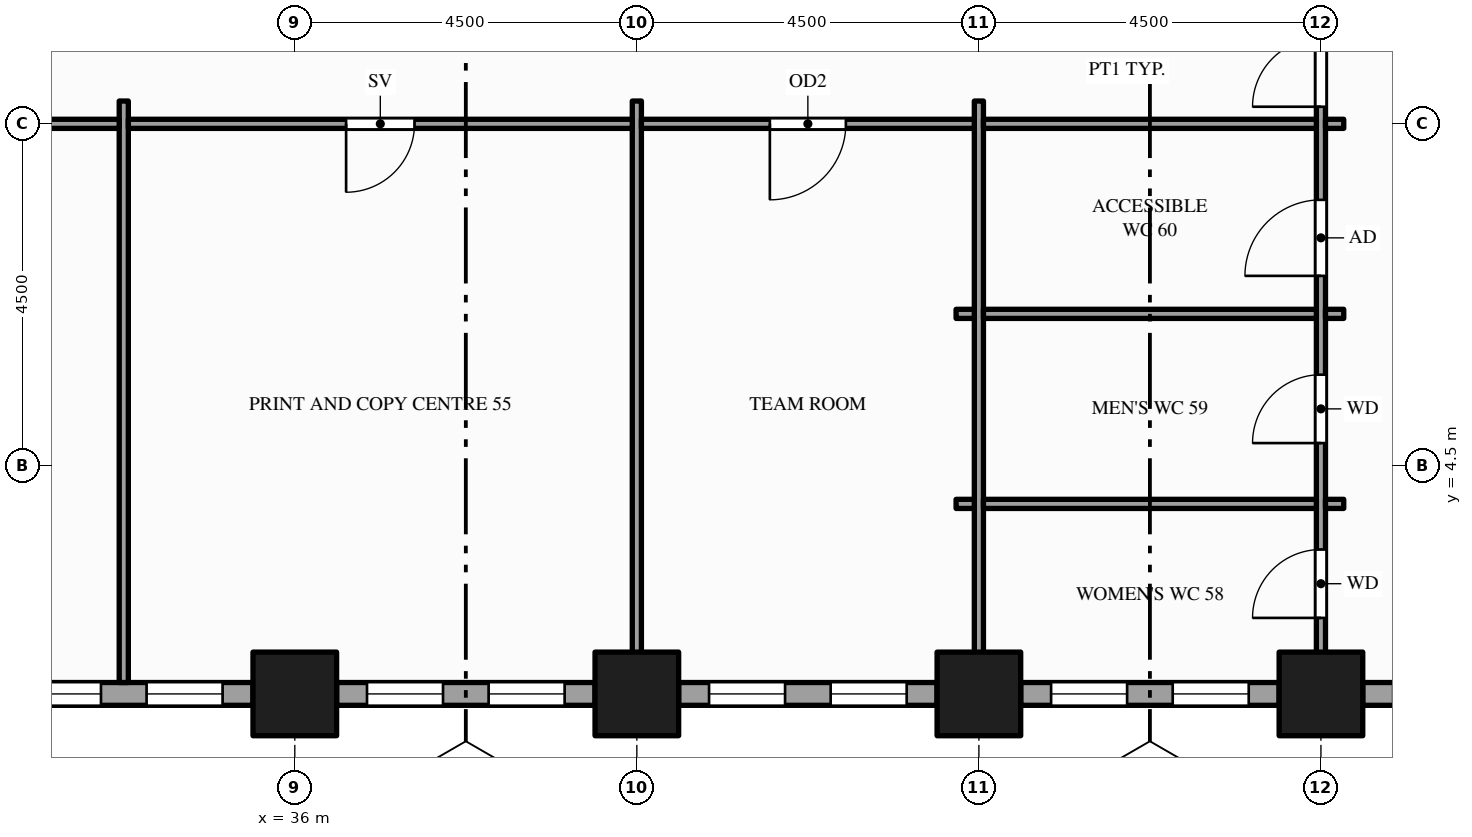
"""IFC4 building model, lengths in metres.
Left out: names, types, materials, properties, quantities, classifications, styles, units other than length and angle.
Written with IfcOpenShell. Run it as: python <this file> out.ifc"""

import sys

from ifc_helpers import new_model, si_unit, direction, frame, frame_2d, origin, origin_2d, place, context, subcontext, project, spatial, rectangle, hollow_rectangle, extrude, element, fill, save


model = new_model("IFC4")
c1 = context("Model", 3, precision=1e-05, world=origin(), true_north=direction((0.0, 1.0)))
c2 = subcontext(c1, "Body", "Model", "MODEL_VIEW")
j1 = project(units=[si_unit("LENGTHUNIT", "METRE"), si_unit("PLANEANGLEUNIT", "RADIAN")], contexts=[c1])
p1 = place(None, origin())
s1 = spatial("IfcSite", under=j1, at=p1, CompositionType="ELEMENT")
p2 = place(p1, origin())
s2 = spatial("IfcBuilding", under=s1, at=p2, CompositionType="ELEMENT")
p3 = place(p2, frame((0.0, 0.0, 33.0)))
s3 = spatial("IfcBuildingStorey", under=s2, at=p3, CompositionType="ELEMENT", Elevation=33.0)
for number, where, z_axis, x_axis in (
    (1, (36.0, 1.5, -0.15), (0.0, 0.0, 1.0), (1.0, 0.0, 0.0)),
    (2, (40.5, 1.5, -0.15), (0.0, 0.0, 1.0), (1.0, 0.0, 0.0)),
    (3, (45.0, 1.5, -0.15), (0.0, 0.0, 1.0), (1.0, 0.0, 0.0)),
    (4, (49.5, 1.5, -0.15), (0.0, 0.0, 1.0), (1.0, 0.0, 0.0)),
):
    element("IfcColumn", number, at=place(p3, frame(where, z_axis=z_axis, x_axis=x_axis)), inside=s3, PredefinedType="COLUMN", context=c2, shape_type="SweptSolid", body=[
        extrude(hollow_rectangle(XDim=1.1, YDim=1.1, WallThickness=0.06, at=origin_2d()), origin(), (0.0, 0.0, 1.0), 4.0),
    ])
p4 = place(p3, frame((32.05, 1.5, 0.0), z_axis=(0.0, 0.0, 1.0), x_axis=(1.0, 0.0, 0.0)))
e5 = element("IfcWall", 5, at=p4, inside=s3, PredefinedType="STANDARD", context=c2, shape_type="SweptSolid", body=[
    extrude(rectangle(XDim=3.4, YDim=0.3, at=frame_2d((1.7, 0.0))), origin(), (0.0, 0.0, 1.0), 3.144),
])
p5 = place(p4, frame((0.4, 0.0, 0.9)))
e6 = element("IfcOpeningElement", 6, at=p5, cuts=e5, PredefinedType="OPENING", context=c2, shape_type="SweptSolid", body=[
    extrude(rectangle(XDim=1.0, YDim=2.0, at=frame_2d((0.5, 1.0))), frame((0.0, 0.16, 0.0), z_axis=(0.0, -1.0, 0.0), x_axis=(1.0, 0.0, 0.0)), (0.0, 0.0, 1.0), 0.32),
])
p6 = place(p4, frame((2.0, 0.0, 0.9)))
e7 = element("IfcOpeningElement", 7, at=p6, cuts=e5, PredefinedType="OPENING", context=c2, shape_type="SweptSolid", body=[
    extrude(rectangle(XDim=1.0, YDim=2.0, at=frame_2d((0.5, 1.0))), frame((0.0, 0.16, 0.0), z_axis=(0.0, -1.0, 0.0), x_axis=(1.0, 0.0, 0.0)), (0.0, 0.0, 1.0), 0.32),
])
p7 = place(p3, frame((36.55, 1.5, 0.0), z_axis=(0.0, 0.0, 1.0), x_axis=(1.0, 0.0, 0.0)))
e8 = element("IfcWall", 8, at=p7, inside=s3, PredefinedType="STANDARD", context=c2, shape_type="SweptSolid", body=[
    extrude(rectangle(XDim=3.4, YDim=0.3, at=frame_2d((1.7, 0.0))), origin(), (0.0, 0.0, 1.0), 3.144),
])
p8 = place(p7, frame((0.4, 0.0, 0.9)))
e9 = element("IfcOpeningElement", 9, at=p8, cuts=e8, PredefinedType="OPENING", context=c2, shape_type="SweptSolid", body=[
    extrude(rectangle(XDim=1.0, YDim=2.0, at=frame_2d((0.5, 1.0))), frame((0.0, 0.16, 0.0), z_axis=(0.0, -1.0, 0.0), x_axis=(1.0, 0.0, 0.0)), (0.0, 0.0, 1.0), 0.32),
])
p9 = place(p7, frame((2.0, 0.0, 0.9)))
e10 = element("IfcOpeningElement", 10, at=p9, cuts=e8, PredefinedType="OPENING", context=c2, shape_type="SweptSolid", body=[
    extrude(rectangle(XDim=1.0, YDim=2.0, at=frame_2d((0.5, 1.0))), frame((0.0, 0.16, 0.0), z_axis=(0.0, -1.0, 0.0), x_axis=(1.0, 0.0, 0.0)), (0.0, 0.0, 1.0), 0.32),
])
p10 = place(p3, frame((41.05, 1.5, 0.0), z_axis=(0.0, 0.0, 1.0), x_axis=(1.0, 0.0, 0.0)))
e11 = element("IfcWall", 11, at=p10, inside=s3, PredefinedType="STANDARD", context=c2, shape_type="SweptSolid", body=[
    extrude(rectangle(XDim=3.4, YDim=0.3, at=frame_2d((1.7, 0.0))), origin(), (0.0, 0.0, 1.0), 3.144),
])
p11 = place(p10, frame((0.4, 0.0, 0.9)))
e12 = element("IfcOpeningElement", 12, at=p11, cuts=e11, PredefinedType="OPENING", context=c2, shape_type="SweptSolid", body=[
    extrude(rectangle(XDim=1.0, YDim=2.0, at=frame_2d((0.5, 1.0))), frame((0.0, 0.16, 0.0), z_axis=(0.0, -1.0, 0.0), x_axis=(1.0, 0.0, 0.0)), (0.0, 0.0, 1.0), 0.32),
])
p12 = place(p10, frame((2.0, 0.0, 0.9)))
e13 = element("IfcOpeningElement", 13, at=p12, cuts=e11, PredefinedType="OPENING", context=c2, shape_type="SweptSolid", body=[
    extrude(rectangle(XDim=1.0, YDim=2.0, at=frame_2d((0.5, 1.0))), frame((0.0, 0.16, 0.0), z_axis=(0.0, -1.0, 0.0), x_axis=(1.0, 0.0, 0.0)), (0.0, 0.0, 1.0), 0.32),
])
p13 = place(p3, frame((45.55, 1.5, 0.0), z_axis=(0.0, 0.0, 1.0), x_axis=(1.0, 0.0, 0.0)))
e14 = element("IfcWall", 14, at=p13, inside=s3, PredefinedType="STANDARD", context=c2, shape_type="SweptSolid", body=[
    extrude(rectangle(XDim=3.4, YDim=0.3, at=frame_2d((1.7, 0.0))), origin(), (0.0, 0.0, 1.0), 3.144),
])
p14 = place(p13, frame((0.4, 0.0, 0.9)))
e15 = element("IfcOpeningElement", 15, at=p14, cuts=e14, PredefinedType="OPENING", context=c2, shape_type="SweptSolid", body=[
    extrude(rectangle(XDim=1.0, YDim=2.0, at=frame_2d((0.5, 1.0))), frame((0.0, 0.16, 0.0), z_axis=(0.0, -1.0, 0.0), x_axis=(1.0, 0.0, 0.0)), (0.0, 0.0, 1.0), 0.32),
])
p15 = place(p13, frame((2.0, 0.0, 0.9)))
e16 = element("IfcOpeningElement", 16, at=p15, cuts=e14, PredefinedType="OPENING", context=c2, shape_type="SweptSolid", body=[
    extrude(rectangle(XDim=1.0, YDim=2.0, at=frame_2d((0.5, 1.0))), frame((0.0, 0.16, 0.0), z_axis=(0.0, -1.0, 0.0), x_axis=(1.0, 0.0, 0.0)), (0.0, 0.0, 1.0), 0.32),
])
p16 = place(p3, frame((50.05, 1.5, 0.0), z_axis=(0.0, 0.0, 1.0), x_axis=(1.0, 0.0, 0.0)))
e17 = element("IfcWall", 17, at=p16, inside=s3, PredefinedType="STANDARD", context=c2, shape_type="SweptSolid", body=[
    extrude(rectangle(XDim=3.95, YDim=0.3, at=frame_2d((1.975, 0.0))), origin(), (0.0, 0.0, 1.0), 3.144),
])
p17 = place(p16, frame((0.4, 0.0, 0.9)))
e18 = element("IfcOpeningElement", 18, at=p17, cuts=e17, PredefinedType="OPENING", context=c2, shape_type="SweptSolid", body=[
    extrude(rectangle(XDim=1.0, YDim=2.0, at=frame_2d((0.5, 1.0))), frame((0.0, 0.16, 0.0), z_axis=(0.0, -1.0, 0.0), x_axis=(1.0, 0.0, 0.0)), (0.0, 0.0, 1.0), 0.32),
])
p18 = place(p16, frame((2.0, 0.0, 0.9)))
e19 = element("IfcOpeningElement", 19, at=p18, cuts=e17, PredefinedType="OPENING", context=c2, shape_type="SweptSolid", body=[
    extrude(rectangle(XDim=1.55, YDim=2.0, at=frame_2d((0.775, 1.0))), frame((0.0, 0.16, 0.0), z_axis=(0.0, -1.0, 0.0), x_axis=(1.0, 0.0, 0.0)), (0.0, 0.0, 1.0), 0.32),
])
for number, where, z_axis, x_axis in (
    (20, (33.75, 1.65, 0.0), (0.0, 0.0, 1.0), (0.0, 1.0, 0.0)),
    (21, (40.5, 1.65, 0.0), (0.0, 0.0, 1.0), (0.0, 1.0, 0.0)),
    (22, (45.0, 1.65, 0.0), (0.0, 0.0, 1.0), (0.0, 1.0, 0.0)),
):
    element("IfcWall", number, at=place(p3, frame(where, z_axis=z_axis, x_axis=x_axis)), inside=s3, PredefinedType="PARTITIONING", context=c2, shape_type="SweptSolid", body=[
        extrude(rectangle(XDim=7.65, YDim=0.12, at=frame_2d((3.825, 0.0))), origin(), (0.0, 0.0, 1.0), 2.938),
    ])
p19 = place(p3, frame((49.5, 1.65, 0.0), z_axis=(0.0, 0.0, 1.0), x_axis=(0.0, 1.0, 0.0)))
e23 = element("IfcWall", 23, at=p19, inside=s3, PredefinedType="PARTITIONING", context=c2, shape_type="SweptSolid", body=[
    extrude(rectangle(XDim=22.2, YDim=0.12, at=frame_2d((11.1, 0.0))), origin(), (0.0, 0.0, 1.0), 2.938),
])
p20 = place(p19, frame((7.575, 0.0, 0.0)))
e24 = element("IfcOpeningElement", 24, at=p20, cuts=e23, PredefinedType="OPENING", context=c2, shape_type="SweptSolid", body=[
    extrude(rectangle(XDim=1.8, YDim=2.1, at=frame_2d((0.9, 1.05))), frame((0.0, 0.07, 0.0), z_axis=(0.0, -1.0, 0.0), x_axis=(1.0, 0.0, 0.0)), (0.0, 0.0, 1.0), 0.14),
])
p21 = place(p19, frame((0.85, 0.0, 0.0)))
e25 = element("IfcOpeningElement", 25, at=p21, cuts=e23, PredefinedType="OPENING", context=c2, shape_type="SweptSolid", body=[
    extrude(rectangle(XDim=0.9, YDim=2.1, at=frame_2d((0.45, 1.05))), frame((0.0, 0.07, 0.0), z_axis=(0.0, -1.0, 0.0), x_axis=(1.0, 0.0, 0.0)), (0.0, 0.0, 1.0), 0.14),
])
p22 = place(p19, frame((3.15, 0.0, 0.0)))
e26 = element("IfcOpeningElement", 26, at=p22, cuts=e23, PredefinedType="OPENING", context=c2, shape_type="SweptSolid", body=[
    extrude(rectangle(XDim=0.9, YDim=2.1, at=frame_2d((0.45, 1.05))), frame((0.0, 0.07, 0.0), z_axis=(0.0, -1.0, 0.0), x_axis=(1.0, 0.0, 0.0)), (0.0, 0.0, 1.0), 0.14),
])
p23 = place(p19, frame((5.35, 0.0, 0.0)))
e27 = element("IfcOpeningElement", 27, at=p23, cuts=e23, PredefinedType="OPENING", context=c2, shape_type="SweptSolid", body=[
    extrude(rectangle(XDim=1.0, YDim=2.1, at=frame_2d((0.5, 1.05))), frame((0.0, 0.07, 0.0), z_axis=(0.0, -1.0, 0.0), x_axis=(1.0, 0.0, 0.0)), (0.0, 0.0, 1.0), 0.14),
])
p24 = place(p3, frame((44.7, 4.0, 0.0), z_axis=(0.0, 0.0, 1.0), x_axis=(1.0, 0.0, 0.0)))
e28 = element("IfcWall", 28, at=p24, inside=s3, PredefinedType="PARTITIONING", context=c2, shape_type="SweptSolid", body=[
    extrude(rectangle(XDim=0.24, YDim=0.12, at=frame_2d((0.12, 0.0))), origin(), (0.0, 0.0, 1.0), 2.938),
])
p25 = place(p3, frame((45.06, 4.0, 0.0), z_axis=(0.0, 0.0, 1.0), x_axis=(1.0, 0.0, 0.0)))
e29 = element("IfcWall", 29, at=p25, inside=s3, PredefinedType="PARTITIONING", context=c2, shape_type="SweptSolid", body=[
    extrude(rectangle(XDim=4.38, YDim=0.12, at=frame_2d((2.19, 0.0))), origin(), (0.0, 0.0, 1.0), 2.938),
])
for number, where, z_axis, x_axis in (
    (30, (49.56, 4.0, 0.0), (0.0, 0.0, 1.0), (1.0, 0.0, 0.0)),
    (31, (44.7, 6.5, 0.0), (0.0, 0.0, 1.0), (1.0, 0.0, 0.0)),
):
    element("IfcWall", number, at=place(p3, frame(where, z_axis=z_axis, x_axis=x_axis)), inside=s3, PredefinedType="PARTITIONING", context=c2, shape_type="SweptSolid", body=[
        extrude(rectangle(XDim=0.24, YDim=0.12, at=frame_2d((0.12, 0.0))), origin(), (0.0, 0.0, 1.0), 2.938),
    ])
p26 = place(p3, frame((45.06, 6.5, 0.0), z_axis=(0.0, 0.0, 1.0), x_axis=(1.0, 0.0, 0.0)))
e32 = element("IfcWall", 32, at=p26, inside=s3, PredefinedType="PARTITIONING", context=c2, shape_type="SweptSolid", body=[
    extrude(rectangle(XDim=4.38, YDim=0.12, at=frame_2d((2.19, 0.0))), origin(), (0.0, 0.0, 1.0), 2.938),
])
p27 = place(p3, frame((49.56, 6.5, 0.0), z_axis=(0.0, 0.0, 1.0), x_axis=(1.0, 0.0, 0.0)))
e33 = element("IfcWall", 33, at=p27, inside=s3, PredefinedType="PARTITIONING", context=c2, shape_type="SweptSolid", body=[
    extrude(rectangle(XDim=0.24, YDim=0.12, at=frame_2d((0.12, 0.0))), origin(), (0.0, 0.0, 1.0), 2.938),
])
p28 = place(p3, frame((29.31, 9.0, 0.0), z_axis=(0.0, 0.0, 1.0), x_axis=(1.0, 0.0, 0.0)))
e34 = element("IfcWall", 34, at=p28, inside=s3, PredefinedType="PARTITIONING", context=c2, shape_type="SweptSolid", body=[
    extrude(rectangle(XDim=4.38, YDim=0.12, at=frame_2d((2.19, 0.0))), origin(), (0.0, 0.0, 1.0), 2.938),
])
p29 = place(p28, frame((1.69, 0.0, 0.0)))
e35 = element("IfcOpeningElement", 35, at=p29, cuts=e34, PredefinedType="OPENING", context=c2, shape_type="SweptSolid", body=[
    extrude(rectangle(XDim=1.0, YDim=2.1, at=frame_2d((0.5, 1.05))), frame((0.0, 0.07, 0.0), z_axis=(0.0, -1.0, 0.0), x_axis=(1.0, 0.0, 0.0)), (0.0, 0.0, 1.0), 0.14),
])
p30 = place(p3, frame((33.81, 9.0, 0.0), z_axis=(0.0, 0.0, 1.0), x_axis=(1.0, 0.0, 0.0)))
e36 = element("IfcWall", 36, at=p30, inside=s3, PredefinedType="PARTITIONING", context=c2, shape_type="SweptSolid", body=[
    extrude(rectangle(XDim=6.63, YDim=0.12, at=frame_2d((3.315, 0.0))), origin(), (0.0, 0.0, 1.0), 2.938),
])
p31 = place(p30, frame((2.865, 0.0, 0.0)))
e37 = element("IfcOpeningElement", 37, at=p31, cuts=e36, PredefinedType="OPENING", context=c2, shape_type="SweptSolid", body=[
    extrude(rectangle(XDim=0.9, YDim=2.1, at=frame_2d((0.45, 1.05))), frame((0.0, 0.07, 0.0), z_axis=(0.0, -1.0, 0.0), x_axis=(1.0, 0.0, 0.0)), (0.0, 0.0, 1.0), 0.14),
])
p32 = place(p3, frame((40.56, 9.0, 0.0), z_axis=(0.0, 0.0, 1.0), x_axis=(1.0, 0.0, 0.0)))
e38 = element("IfcWall", 38, at=p32, inside=s3, PredefinedType="PARTITIONING", context=c2, shape_type="SweptSolid", body=[
    extrude(rectangle(XDim=4.38, YDim=0.12, at=frame_2d((2.19, 0.0))), origin(), (0.0, 0.0, 1.0), 2.938),
])
p33 = place(p32, frame((1.69, 0.0, 0.0)))
e39 = element("IfcOpeningElement", 39, at=p33, cuts=e38, PredefinedType="OPENING", context=c2, shape_type="SweptSolid", body=[
    extrude(rectangle(XDim=1.0, YDim=2.1, at=frame_2d((0.5, 1.05))), frame((0.0, 0.07, 0.0), z_axis=(0.0, -1.0, 0.0), x_axis=(1.0, 0.0, 0.0)), (0.0, 0.0, 1.0), 0.14),
])
p34 = place(p3, frame((45.06, 9.0, 0.0), z_axis=(0.0, 0.0, 1.0), x_axis=(1.0, 0.0, 0.0)))
e40 = element("IfcWall", 40, at=p34, inside=s3, PredefinedType="PARTITIONING", context=c2, shape_type="SweptSolid", body=[
    extrude(rectangle(XDim=4.38, YDim=0.12, at=frame_2d((2.19, 0.0))), origin(), (0.0, 0.0, 1.0), 2.938),
])
p35 = place(p3, frame((49.56, 9.0, 0.0), z_axis=(0.0, 0.0, 1.0), x_axis=(1.0, 0.0, 0.0)))
e41 = element("IfcWall", 41, at=p35, inside=s3, PredefinedType="PARTITIONING", context=c2, shape_type="SweptSolid", body=[
    extrude(rectangle(XDim=0.24, YDim=0.12, at=frame_2d((0.12, 0.0))), origin(), (0.0, 0.0, 1.0), 2.938),
])
p36 = place(p5, origin())
e42 = element("IfcWindow", 42, at=p36, inside=s3, PartitioningType="SINGLE_PANEL", PredefinedType="WINDOW", context=c2, shape_type="SweptSolid", body=[
    extrude(rectangle(XDim=1.0, YDim=2.0, at=frame_2d((0.5, 1.0))), frame((0.0, 0.03, 0.0), z_axis=(0.0, -1.0, 0.0), x_axis=(1.0, 0.0, 0.0)), (0.0, 0.0, 1.0), 0.06),
])
fill(e6, e42)
p37 = place(p6, origin())
e43 = element("IfcWindow", 43, at=p37, inside=s3, PartitioningType="SINGLE_PANEL", PredefinedType="WINDOW", context=c2, shape_type="SweptSolid", body=[
    extrude(rectangle(XDim=1.0, YDim=2.0, at=frame_2d((0.5, 1.0))), frame((0.0, 0.03, 0.0), z_axis=(0.0, -1.0, 0.0), x_axis=(1.0, 0.0, 0.0)), (0.0, 0.0, 1.0), 0.06),
])
fill(e7, e43)
p38 = place(p8, origin())
e44 = element("IfcWindow", 44, at=p38, inside=s3, PartitioningType="SINGLE_PANEL", PredefinedType="WINDOW", context=c2, shape_type="SweptSolid", body=[
    extrude(rectangle(XDim=1.0, YDim=2.0, at=frame_2d((0.5, 1.0))), frame((0.0, 0.03, 0.0), z_axis=(0.0, -1.0, 0.0), x_axis=(1.0, 0.0, 0.0)), (0.0, 0.0, 1.0), 0.06),
])
fill(e9, e44)
p39 = place(p9, origin())
e45 = element("IfcWindow", 45, at=p39, inside=s3, PartitioningType="SINGLE_PANEL", PredefinedType="WINDOW", context=c2, shape_type="SweptSolid", body=[
    extrude(rectangle(XDim=1.0, YDim=2.0, at=frame_2d((0.5, 1.0))), frame((0.0, 0.03, 0.0), z_axis=(0.0, -1.0, 0.0), x_axis=(1.0, 0.0, 0.0)), (0.0, 0.0, 1.0), 0.06),
])
fill(e10, e45)
p40 = place(p11, origin())
e46 = element("IfcWindow", 46, at=p40, inside=s3, PartitioningType="SINGLE_PANEL", PredefinedType="WINDOW", context=c2, shape_type="SweptSolid", body=[
    extrude(rectangle(XDim=1.0, YDim=2.0, at=frame_2d((0.5, 1.0))), frame((0.0, 0.03, 0.0), z_axis=(0.0, -1.0, 0.0), x_axis=(1.0, 0.0, 0.0)), (0.0, 0.0, 1.0), 0.06),
])
fill(e12, e46)
p41 = place(p12, origin())
e47 = element("IfcWindow", 47, at=p41, inside=s3, PartitioningType="SINGLE_PANEL", PredefinedType="WINDOW", context=c2, shape_type="SweptSolid", body=[
    extrude(rectangle(XDim=1.0, YDim=2.0, at=frame_2d((0.5, 1.0))), frame((0.0, 0.03, 0.0), z_axis=(0.0, -1.0, 0.0), x_axis=(1.0, 0.0, 0.0)), (0.0, 0.0, 1.0), 0.06),
])
fill(e13, e47)
p42 = place(p14, origin())
e48 = element("IfcWindow", 48, at=p42, inside=s3, PartitioningType="SINGLE_PANEL", PredefinedType="WINDOW", context=c2, shape_type="SweptSolid", body=[
    extrude(rectangle(XDim=1.0, YDim=2.0, at=frame_2d((0.5, 1.0))), frame((0.0, 0.03, 0.0), z_axis=(0.0, -1.0, 0.0), x_axis=(1.0, 0.0, 0.0)), (0.0, 0.0, 1.0), 0.06),
])
fill(e15, e48)
p43 = place(p15, origin())
e49 = element("IfcWindow", 49, at=p43, inside=s3, PartitioningType="SINGLE_PANEL", PredefinedType="WINDOW", context=c2, shape_type="SweptSolid", body=[
    extrude(rectangle(XDim=1.0, YDim=2.0, at=frame_2d((0.5, 1.0))), frame((0.0, 0.03, 0.0), z_axis=(0.0, -1.0, 0.0), x_axis=(1.0, 0.0, 0.0)), (0.0, 0.0, 1.0), 0.06),
])
fill(e16, e49)
p44 = place(p20, origin())
e50 = element("IfcDoor", 50, at=p44, inside=s3, OperationType="DOUBLE_DOOR_SINGLE_SWING", PredefinedType="DOOR", context=c2, shape_type="SweptSolid", body=[
    extrude(rectangle(XDim=1.8, YDim=2.1, at=frame_2d((0.9, 1.05))), frame((0.0, 0.025, 0.0), z_axis=(0.0, -1.0, 0.0), x_axis=(1.0, 0.0, 0.0)), (0.0, 0.0, 1.0), 0.05),
])
fill(e24, e50)
p45 = place(p31, origin())
e51 = element("IfcDoor", 51, at=p45, inside=s3, OperationType="SINGLE_SWING_LEFT", PredefinedType="DOOR", context=c2, shape_type="SweptSolid", body=[
    extrude(rectangle(XDim=0.9, YDim=2.1, at=frame_2d((0.45, 1.05))), frame((0.0, 0.025, 0.0), z_axis=(0.0, -1.0, 0.0), x_axis=(1.0, 0.0, 0.0)), (0.0, 0.0, 1.0), 0.05),
])
fill(e37, e51)
p46 = place(p33, origin())
e52 = element("IfcDoor", 52, at=p46, inside=s3, OperationType="SINGLE_SWING_LEFT", PredefinedType="DOOR", context=c2, shape_type="SweptSolid", body=[
    extrude(rectangle(XDim=1.0, YDim=2.1, at=frame_2d((0.5, 1.05))), frame((0.0, 0.025, 0.0), z_axis=(0.0, -1.0, 0.0), x_axis=(1.0, 0.0, 0.0)), (0.0, 0.0, 1.0), 0.05),
])
fill(e39, e52)
p47 = place(p21, origin())
e53 = element("IfcDoor", 53, at=p47, inside=s3, OperationType="SINGLE_SWING_LEFT", PredefinedType="DOOR", context=c2, shape_type="SweptSolid", body=[
    extrude(rectangle(XDim=0.9, YDim=2.1, at=frame_2d((0.45, 1.05))), frame((0.0, 0.025, 0.0), z_axis=(0.0, -1.0, 0.0), x_axis=(1.0, 0.0, 0.0)), (0.0, 0.0, 1.0), 0.05),
])
fill(e25, e53)
p48 = place(p22, origin())
e54 = element("IfcDoor", 54, at=p48, inside=s3, OperationType="SINGLE_SWING_LEFT", PredefinedType="DOOR", context=c2, shape_type="SweptSolid", body=[
    extrude(rectangle(XDim=0.9, YDim=2.1, at=frame_2d((0.45, 1.05))), frame((0.0, 0.025, 0.0), z_axis=(0.0, -1.0, 0.0), x_axis=(1.0, 0.0, 0.0)), (0.0, 0.0, 1.0), 0.05),
])
fill(e26, e54)
p49 = place(p23, origin())
e55 = element("IfcDoor", 55, at=p49, inside=s3, OperationType="SINGLE_SWING_LEFT", PredefinedType="DOOR", context=c2, shape_type="SweptSolid", body=[
    extrude(rectangle(XDim=1.0, YDim=2.1, at=frame_2d((0.5, 1.05))), frame((0.0, 0.025, 0.0), z_axis=(0.0, -1.0, 0.0), x_axis=(1.0, 0.0, 0.0)), (0.0, 0.0, 1.0), 0.05),
])
fill(e27, e55)
save(model, sys.argv[1])
